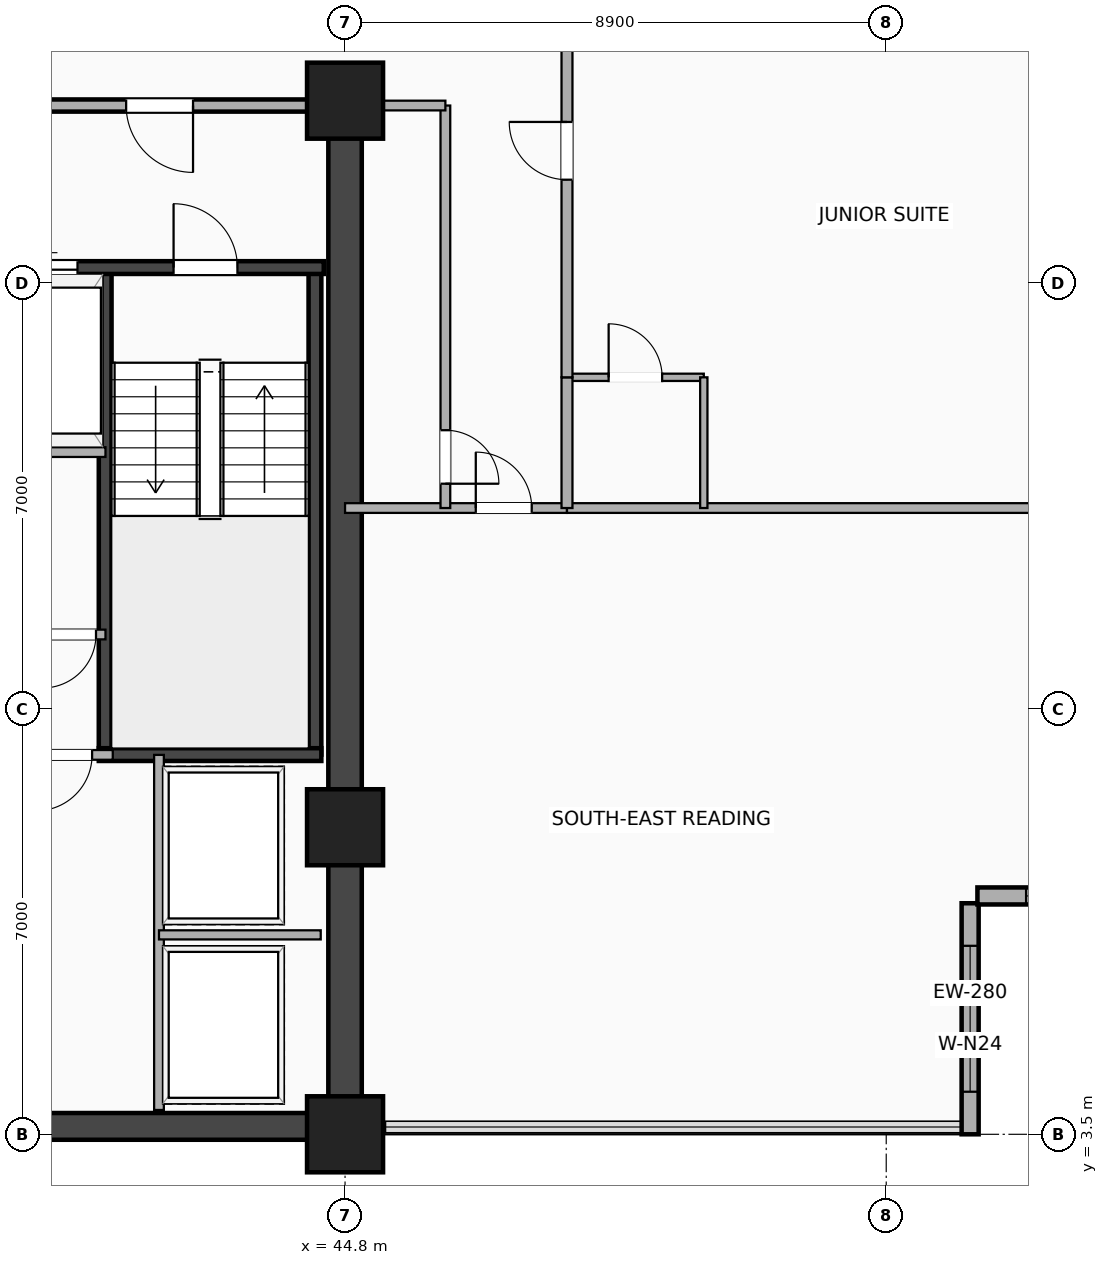
"""IFC4 building model, lengths in metres.
Left out: names, types, materials, properties, quantities, classifications, styles, units other than length and angle.
Written with IfcOpenShell. Run it as: python <this file> out.ifc"""

import sys

from ifc_helpers import new_model, si_unit, direction, frame, frame_2d, origin, origin_2d, place, context, subcontext, project, spatial, rectangle, extrude, element, fill, save


model = new_model("IFC4")
c1 = context("Model", 3, precision=1e-05, world=origin(), true_north=direction((0.0, 1.0)))
c2 = subcontext(c1, "Body", "Model", "MODEL_VIEW")
j1 = project(units=[si_unit("LENGTHUNIT", "METRE"), si_unit("PLANEANGLEUNIT", "RADIAN")], contexts=[c1])
p1 = place(None, origin())
s1 = spatial("IfcSite", under=j1, at=p1, CompositionType="ELEMENT")
p2 = place(p1, origin())
s2 = spatial("IfcBuilding", under=s1, at=p2, CompositionType="ELEMENT")
p3 = place(p2, frame((0.0, 0.0, 91.7)))
s3 = spatial("IfcBuildingStorey", under=s2, at=p3, CompositionType="ELEMENT", Elevation=91.7)
p4 = place(p3, frame((20.3, 3.63, 0.0), z_axis=(0.0, 0.0, 1.0), x_axis=(1.0, 0.0, 0.0)))
e1 = element("IfcWall", 1, at=p4, inside=s3, PredefinedType="SHEAR", context=c2, shape_type="SweptSolid", body=[
    extrude(rectangle(XDim=24.5, YDim=0.44, at=frame_2d((12.25, 0.0))), origin(), (0.0, 0.0, 1.0), 3.24),
])
p5 = place(p3, frame((44.8, 3.5, 0.0), z_axis=(0.0, 0.0, 1.0), x_axis=(0.0, 1.0, 0.0)))
e2 = element("IfcWall", 2, at=p5, inside=s3, PredefinedType="SHEAR", context=c2, shape_type="SweptSolid", body=[
    extrude(rectangle(XDim=16.9, YDim=0.55, at=frame_2d((8.45, 0.0))), origin(), (0.0, 0.0, 1.0), 3.24),
])
for number, where, z_axis, x_axis in (
    (3, (40.855, 9.745, 0.0), (0.0, 0.0, 1.0), (0.0, 1.0, 0.0)),
    (4, (44.305, 9.745, 0.0), (0.0, 0.0, 1.0), (0.0, 1.0, 0.0)),
):
    element("IfcWall", number, at=place(p3, frame(where, z_axis=z_axis, x_axis=x_axis)), inside=s3, PredefinedType="SHEAR", context=c2, shape_type="SweptSolid", body=[
        extrude(rectangle(XDim=8.01, YDim=0.21, at=frame_2d((4.005, 0.0))), origin(), (0.0, 0.0, 1.0), 3.24),
    ])
p6 = place(p3, frame((40.75, 9.745, 0.0), z_axis=(0.0, 0.0, 1.0), x_axis=(1.0, 0.0, 0.0)))
e5 = element("IfcWall", 5, at=p6, inside=s3, PredefinedType="SHEAR", context=c2, shape_type="SweptSolid", body=[
    extrude(rectangle(XDim=3.66, YDim=0.21, at=frame_2d((1.83, 0.0))), origin(), (0.0, 0.0, 1.0), 3.24),
])
p7 = place(p3, frame((37.25, 17.755, 0.0), z_axis=(0.0, 0.0, 1.0), x_axis=(1.0, 0.0, 0.0)))
e6 = element("IfcWall", 6, at=p7, inside=s3, PredefinedType="SHEAR", context=c2, shape_type="SweptSolid", body=[
    extrude(rectangle(XDim=7.2, YDim=0.21, at=frame_2d((3.6, 0.0))), origin(), (0.0, 0.0, 1.0), 3.24),
])
p8 = place(p7, frame((0.25, 0.0, 0.0)))
e7 = element("IfcOpeningElement", 7, at=p8, cuts=e6, PredefinedType="OPENING", context=c2, shape_type="SweptSolid", body=[
    extrude(rectangle(XDim=1.12, YDim=2.2, at=frame_2d((0.56, 1.1))), frame((0.0, 0.115, 0.0), z_axis=(0.0, -1.0, 0.0), x_axis=(1.0, 0.0, 0.0)), (0.0, 0.0, 1.0), 0.23),
])
p9 = place(p7, frame((2.05, 0.0, 0.0)))
e8 = element("IfcOpeningElement", 8, at=p9, cuts=e6, PredefinedType="OPENING", context=c2, shape_type="SweptSolid", body=[
    extrude(rectangle(XDim=1.1, YDim=2.18, at=frame_2d((0.55, 1.09))), frame((0.0, 0.115, 0.0), z_axis=(0.0, -1.0, 0.0), x_axis=(1.0, 0.0, 0.0)), (0.0, 0.0, 1.0), 0.23),
])
p10 = place(p7, frame((5.78, 0.0, 0.0), z_axis=(0.0, 0.0, 1.0), x_axis=(-1.0, 0.0, 0.0)))
e9 = element("IfcOpeningElement", 9, at=p10, cuts=e6, PredefinedType="OPENING", context=c2, shape_type="SweptSolid", body=[
    extrude(rectangle(XDim=1.05, YDim=2.15, at=frame_2d((0.525, 1.075))), frame((0.0, 0.115, 0.0), z_axis=(0.0, -1.0, 0.0), x_axis=(1.0, 0.0, 0.0)), (0.0, 0.0, 1.0), 0.23),
])
for number, where, z_axis, x_axis in (
    (10, (44.8, 3.5, -0.26), (0.0, 0.0, 1.0), (1.0, 0.0, 0.0)),
    (11, (44.8, 8.55, -0.26), (0.0, 0.0, 1.0), (1.0, 0.0, 0.0)),
    (12, (44.8, 20.5, -0.26), (0.0, 0.0, 1.0), (1.0, 0.0, 0.0)),
):
    element("IfcColumn", number, at=place(p3, frame(where, z_axis=z_axis, x_axis=x_axis)), inside=s3, PredefinedType="COLUMN", context=c2, shape_type="SweptSolid", body=[
        extrude(rectangle(XDim=1.25, YDim=1.25, at=origin_2d()), origin(), (0.0, 0.0, 1.0), 3.5),
    ])
p11 = place(p3, frame((55.08, 3.5, 0.0), z_axis=(0.0, 0.0, 1.0), x_axis=(0.0, 1.0, 0.0)))
e13 = element("IfcWall", 13, at=p11, inside=s3, PredefinedType="SOLIDWALL", context=c2, shape_type="SweptSolid", body=[
    extrude(rectangle(XDim=3.8, YDim=0.28, at=frame_2d((1.9, 0.0))), origin(), (0.0, 0.0, 1.0), 3.24),
])
p12 = place(p11, frame((0.7, 0.0, 0.85)))
e14 = element("IfcOpeningElement", 14, at=p12, cuts=e13, PredefinedType="OPENING", context=c2, shape_type="SweptSolid", body=[
    extrude(rectangle(XDim=2.4, YDim=1.65, at=frame_2d((1.2, 0.825))), frame((0.0, 0.15, 0.0), z_axis=(0.0, -1.0, 0.0), x_axis=(1.0, 0.0, 0.0)), (0.0, 0.0, 1.0), 0.3),
])
p13 = place(p3, frame((55.2, 7.42, 0.0), z_axis=(0.0, 0.0, 1.0), x_axis=(1.0, 0.0, 0.0)))
e15 = element("IfcWall", 15, at=p13, inside=s3, PredefinedType="SOLIDWALL", context=c2, shape_type="SweptSolid", body=[
    extrude(rectangle(XDim=3.8, YDim=0.28, at=frame_2d((1.9, 0.0))), origin(), (0.0, 0.0, 1.0), 3.24),
])
p14 = place(p13, frame((0.8, 0.0, 0.85)))
e16 = element("IfcOpeningElement", 16, at=p14, cuts=e15, PredefinedType="OPENING", context=c2, shape_type="SweptSolid", body=[
    extrude(rectangle(XDim=2.2, YDim=1.65, at=frame_2d((1.1, 0.825))), frame((0.0, 0.15, 0.0), z_axis=(0.0, -1.0, 0.0), x_axis=(1.0, 0.0, 0.0)), (0.0, 0.0, 1.0), 0.3),
])
p15 = place(p3, frame((37.25, 14.72, 0.0), z_axis=(0.0, 0.0, 1.0), x_axis=(1.0, 0.0, 0.0)))
e17 = element("IfcWall", 17, at=p15, inside=s3, PredefinedType="PARTITIONING", context=c2, shape_type="SweptSolid", body=[
    extrude(rectangle(XDim=3.61, YDim=0.16, at=frame_2d((1.805, 0.0))), origin(), (0.0, 0.0, 1.0), 3.24),
])
p16 = place(p3, frame((37.0, 20.42, 0.0), z_axis=(0.0, 0.0, 1.0), x_axis=(1.0, 0.0, 0.0)))
e18 = element("IfcWall", 18, at=p16, inside=s3, PredefinedType="PARTITIONING", context=c2, shape_type="SweptSolid", body=[
    extrude(rectangle(XDim=7.45, YDim=0.2, at=frame_2d((3.725, 0.0))), origin(), (0.0, 0.0, 1.0), 2.313),
])
p17 = place(p16, frame((4.2, 0.0, 0.0)))
e19 = element("IfcOpeningElement", 19, at=p17, cuts=e18, PredefinedType="OPENING", context=c2, shape_type="SweptSolid", body=[
    extrude(rectangle(XDim=1.1, YDim=2.15, at=frame_2d((0.55, 1.075))), frame((0.0, 0.11, 0.0), z_axis=(0.0, -1.0, 0.0), x_axis=(1.0, 0.0, 0.0)), (0.0, 0.0, 1.0), 0.22),
])
p18 = place(p3, frame((39.669, 11.72, 0.0), z_axis=(0.0, 0.0, 1.0), x_axis=(1.0, 0.0, 0.0)))
e20 = element("IfcWall", 20, at=p18, inside=s3, PredefinedType="PARTITIONING", context=c2, shape_type="SweptSolid", body=[
    extrude(rectangle(XDim=1.191, YDim=0.16, at=frame_2d((0.596, 0.0))), origin(), (0.0, 0.0, 1.0), 3.24),
])
p19 = place(p18, frame((0.156, 0.0, 0.0)))
e21 = element("IfcOpeningElement", 21, at=p19, cuts=e20, PredefinedType="OPENING", context=c2, shape_type="SweptSolid", body=[
    extrude(rectangle(XDim=0.88, YDim=2.08, at=frame_2d((0.44, 1.04))), frame((0.0, 0.09, 0.0), z_axis=(0.0, -1.0, 0.0), x_axis=(1.0, 0.0, 0.0)), (0.0, 0.0, 1.0), 0.18),
])
p20 = place(p3, frame((41.74, 3.9, 0.0), z_axis=(0.0, 0.0, 1.0), x_axis=(0.0, 1.0, 0.0)))
e22 = element("IfcWall", 22, at=p20, inside=s3, PredefinedType="PARTITIONING", context=c2, shape_type="SweptSolid", body=[
    extrude(rectangle(XDim=5.84, YDim=0.16, at=frame_2d((2.92, 0.0))), origin(), (0.0, 0.0, 1.0), 3.24),
])
p21 = place(p3, frame((41.74, 6.78, 0.0), z_axis=(0.0, 0.0, 1.0), x_axis=(1.0, 0.0, 0.0)))
e23 = element("IfcWall", 23, at=p21, inside=s3, PredefinedType="PARTITIONING", context=c2, shape_type="SweptSolid", body=[
    extrude(rectangle(XDim=2.66, YDim=0.15, at=frame_2d((1.33, 0.0))), origin(), (0.0, 0.0, 1.0), 2.313),
])
p22 = place(p3, frame((39.42, 9.74, 0.0), z_axis=(0.0, 0.0, 1.0), x_axis=(1.0, 0.0, 0.0)))
e24 = element("IfcWall", 24, at=p22, inside=s3, PredefinedType="PARTITIONING", context=c2, shape_type="SweptSolid", body=[
    extrude(rectangle(XDim=1.56, YDim=0.16, at=frame_2d((0.78, 0.0))), origin(), (0.0, 0.0, 1.0), 3.24),
])
p23 = place(p22, frame((0.3, 0.0, 0.0)))
e25 = element("IfcOpeningElement", 25, at=p23, cuts=e24, PredefinedType="OPENING", context=c2, shape_type="SweptSolid", body=[
    extrude(rectangle(XDim=0.92, YDim=2.08, at=frame_2d((0.46, 1.04))), frame((0.0, 0.09, 0.0), z_axis=(0.0, -1.0, 0.0), x_axis=(1.0, 0.0, 0.0)), (0.0, 0.0, 1.0), 0.18),
])
p24 = place(p3, frame((44.8, 13.8, 0.0), z_axis=(0.0, 0.0, 1.0), x_axis=(1.0, 0.0, 0.0)))
e26 = element("IfcWall", 26, at=p24, inside=s3, PredefinedType="PARTITIONING", context=c2, shape_type="SweptSolid", body=[
    extrude(rectangle(XDim=3.65, YDim=0.16, at=frame_2d((1.825, 0.0))), origin(), (0.0, 0.0, 1.0), 2.313),
])
p25 = place(p24, frame((3.07, 0.0, 0.0), z_axis=(0.0, 0.0, 1.0), x_axis=(-1.0, 0.0, 0.0)))
e27 = element("IfcOpeningElement", 27, at=p25, cuts=e26, PredefinedType="OPENING", context=c2, shape_type="SweptSolid", body=[
    extrude(rectangle(XDim=0.92, YDim=2.08, at=frame_2d((0.46, 1.04))), frame((0.0, 0.09, 0.0), z_axis=(0.0, -1.0, 0.0), x_axis=(1.0, 0.0, 0.0)), (0.0, 0.0, 1.0), 0.18),
])
p26 = place(p3, frame((46.45, 13.8, 0.0), z_axis=(0.0, 0.0, 1.0), x_axis=(0.0, 1.0, 0.0)))
e28 = element("IfcWall", 28, at=p26, inside=s3, PredefinedType="PARTITIONING", context=c2, shape_type="SweptSolid", body=[
    extrude(rectangle(XDim=6.62, YDim=0.16, at=frame_2d((3.31, 0.0))), origin(), (0.0, 0.0, 1.0), 2.313),
])
p27 = place(p26, frame((0.4, 0.0, 0.0)))
e29 = element("IfcOpeningElement", 29, at=p27, cuts=e28, PredefinedType="OPENING", context=c2, shape_type="SweptSolid", body=[
    extrude(rectangle(XDim=0.88, YDim=2.08, at=frame_2d((0.44, 1.04))), frame((0.0, 0.09, 0.0), z_axis=(0.0, -1.0, 0.0), x_axis=(1.0, 0.0, 0.0)), (0.0, 0.0, 1.0), 0.18),
])
p28 = place(p3, frame((44.8, 20.42, 0.0), z_axis=(0.0, 0.0, 1.0), x_axis=(1.0, 0.0, 0.0)))
e30 = element("IfcWall", 30, at=p28, inside=s3, PredefinedType="PARTITIONING", context=c2, shape_type="SweptSolid", body=[
    extrude(rectangle(XDim=1.65, YDim=0.16, at=frame_2d((0.825, 0.0))), origin(), (0.0, 0.0, 1.0), 2.313),
])
p29 = place(p3, frame((48.45, 13.8, 0.0), z_axis=(0.0, 0.0, 1.0), x_axis=(1.0, 0.0, 0.0)))
e31 = element("IfcWall", 31, at=p29, inside=s3, PredefinedType="PARTITIONING", context=c2, shape_type="SweptSolid", body=[
    extrude(rectangle(XDim=10.43, YDim=0.16, at=frame_2d((5.215, 0.0))), origin(), (0.0, 0.0, 1.0), 2.603),
])
p30 = place(p3, frame((48.45, 15.95, 0.0), z_axis=(0.0, 0.0, 1.0), x_axis=(1.0, 0.0, 0.0)))
e32 = element("IfcWall", 32, at=p30, inside=s3, PredefinedType="PARTITIONING", context=c2, shape_type="SweptSolid", body=[
    extrude(rectangle(XDim=2.25, YDim=0.12, at=frame_2d((1.125, 0.0))), origin(), (0.0, 0.0, 1.0), 3.24),
])
p31 = place(p30, frame((1.565, 0.0, 0.0), z_axis=(0.0, 0.0, 1.0), x_axis=(-1.0, 0.0, 0.0)))
e33 = element("IfcOpeningElement", 33, at=p31, cuts=e32, PredefinedType="OPENING", context=c2, shape_type="SweptSolid", body=[
    extrude(rectangle(XDim=0.88, YDim=2.08, at=frame_2d((0.44, 1.04))), frame((0.0, 0.07, 0.0), z_axis=(0.0, -1.0, 0.0), x_axis=(1.0, 0.0, 0.0)), (0.0, 0.0, 1.0), 0.14),
])
p32 = place(p3, frame((50.7, 13.8, 0.0), z_axis=(0.0, 0.0, 1.0), x_axis=(0.0, 1.0, 0.0)))
e34 = element("IfcWall", 34, at=p32, inside=s3, PredefinedType="PARTITIONING", context=c2, shape_type="SweptSolid", body=[
    extrude(rectangle(XDim=2.15, YDim=0.12, at=frame_2d((1.075, 0.0))), origin(), (0.0, 0.0, 1.0), 2.922),
])
p33 = place(p3, frame((48.45, 13.8, 0.0), z_axis=(0.0, 0.0, 1.0), x_axis=(0.0, 1.0, 0.0)))
e35 = element("IfcWall", 35, at=p33, inside=s3, PredefinedType="PARTITIONING", context=c2, shape_type="SweptSolid", body=[
    extrude(rectangle(XDim=2.15, YDim=0.18, at=frame_2d((1.075, 0.0))), origin(), (0.0, 0.0, 1.0), 2.922),
])
p34 = place(p3, frame((48.45, 15.95, 0.0), z_axis=(0.0, 0.0, 1.0), x_axis=(0.0, 1.0, 0.0)))
e36 = element("IfcWall", 36, at=p34, inside=s3, PredefinedType="PARTITIONING", context=c2, shape_type="SweptSolid", body=[
    extrude(rectangle(XDim=7.45, YDim=0.18, at=frame_2d((3.725, 0.0))), origin(), (0.0, 0.0, 1.0), 2.313),
])
p35 = place(p34, frame((4.2, 0.0, 0.0), z_axis=(0.0, 0.0, 1.0), x_axis=(-1.0, 0.0, 0.0)))
e37 = element("IfcOpeningElement", 37, at=p35, cuts=e36, PredefinedType="OPENING", context=c2, shape_type="SweptSolid", body=[
    extrude(rectangle(XDim=0.95, YDim=2.15, at=frame_2d((0.475, 1.075))), frame((0.0, 0.1, 0.0), z_axis=(0.0, -1.0, 0.0), x_axis=(1.0, 0.0, 0.0)), (0.0, 0.0, 1.0), 0.2),
])
p36 = place(p12, origin())
e38 = element("IfcWindow", 38, at=p36, inside=s3, PartitioningType="SINGLE_PANEL", PredefinedType="WINDOW", context=c2, shape_type="SweptSolid", body=[
    extrude(rectangle(XDim=2.4, YDim=1.65, at=frame_2d((1.2, 0.825))), frame((0.0, 0.03, 0.0), z_axis=(0.0, -1.0, 0.0), x_axis=(1.0, 0.0, 0.0)), (0.0, 0.0, 1.0), 0.06),
])
fill(e14, e38)
p37 = place(p14, origin())
e39 = element("IfcWindow", 39, at=p37, inside=s3, PartitioningType="SINGLE_PANEL", PredefinedType="WINDOW", context=c2, shape_type="SweptSolid", body=[
    extrude(rectangle(XDim=2.2, YDim=1.65, at=frame_2d((1.1, 0.825))), frame((0.0, 0.03, 0.0), z_axis=(0.0, -1.0, 0.0), x_axis=(1.0, 0.0, 0.0)), (0.0, 0.0, 1.0), 0.06),
])
fill(e16, e39)
p38 = place(p9, origin())
e40 = element("IfcDoor", 40, at=p38, inside=s3, OperationType="DOUBLE_DOOR_SLIDING", PredefinedType="DOOR", context=c2, shape_type="SweptSolid", body=[
    extrude(rectangle(XDim=1.1, YDim=2.18, at=frame_2d((0.55, 1.09))), frame((0.0, 0.025, 0.0), z_axis=(0.0, -1.0, 0.0), x_axis=(1.0, 0.0, 0.0)), (0.0, 0.0, 1.0), 0.05),
])
fill(e8, e40)
p39 = place(p10, origin())
e41 = element("IfcDoor", 41, at=p39, inside=s3, OperationType="SINGLE_SWING_LEFT", PredefinedType="DOOR", context=c2, shape_type="SweptSolid", body=[
    extrude(rectangle(XDim=1.05, YDim=2.15, at=frame_2d((0.525, 1.075))), frame((0.0, 0.025, 0.0), z_axis=(0.0, -1.0, 0.0), x_axis=(1.0, 0.0, 0.0)), (0.0, 0.0, 1.0), 0.05),
])
fill(e9, e41)
p40 = place(p17, origin())
e42 = element("IfcDoor", 42, at=p40, inside=s3, OperationType="SINGLE_SWING_RIGHT", PredefinedType="DOOR", context=c2, shape_type="SweptSolid", body=[
    extrude(rectangle(XDim=1.1, YDim=2.15, at=frame_2d((0.55, 1.075))), frame((0.0, 0.025, 0.0), z_axis=(0.0, -1.0, 0.0), x_axis=(1.0, 0.0, 0.0)), (0.0, 0.0, 1.0), 0.05),
])
fill(e19, e42)
p41 = place(p19, origin())
e43 = element("IfcDoor", 43, at=p41, inside=s3, OperationType="SINGLE_SWING_LEFT", PredefinedType="DOOR", context=c2, shape_type="SweptSolid", body=[
    extrude(rectangle(XDim=0.88, YDim=2.08, at=frame_2d((0.44, 1.04))), frame((0.0, 0.025, 0.0), z_axis=(0.0, -1.0, 0.0), x_axis=(1.0, 0.0, 0.0)), (0.0, 0.0, 1.0), 0.05),
])
fill(e21, e43)
p42 = place(p23, origin())
e44 = element("IfcDoor", 44, at=p42, inside=s3, OperationType="SINGLE_SWING_LEFT", PredefinedType="DOOR", context=c2, shape_type="SweptSolid", body=[
    extrude(rectangle(XDim=0.92, YDim=2.08, at=frame_2d((0.46, 1.04))), frame((0.0, 0.025, 0.0), z_axis=(0.0, -1.0, 0.0), x_axis=(1.0, 0.0, 0.0)), (0.0, 0.0, 1.0), 0.05),
])
fill(e25, e44)
p43 = place(p25, origin())
e45 = element("IfcDoor", 45, at=p43, inside=s3, OperationType="SINGLE_SWING_LEFT", PredefinedType="DOOR", context=c2, shape_type="SweptSolid", body=[
    extrude(rectangle(XDim=0.92, YDim=2.08, at=frame_2d((0.46, 1.04))), frame((0.0, 0.025, 0.0), z_axis=(0.0, -1.0, 0.0), x_axis=(1.0, 0.0, 0.0)), (0.0, 0.0, 1.0), 0.05),
])
fill(e27, e45)
p44 = place(p27, origin())
e46 = element("IfcDoor", 46, at=p44, inside=s3, OperationType="SINGLE_SWING_LEFT", PredefinedType="DOOR", context=c2, shape_type="SweptSolid", body=[
    extrude(rectangle(XDim=0.88, YDim=2.08, at=frame_2d((0.44, 1.04))), frame((0.0, 0.025, 0.0), z_axis=(0.0, -1.0, 0.0), x_axis=(1.0, 0.0, 0.0)), (0.0, 0.0, 1.0), 0.05),
])
fill(e29, e46)
p45 = place(p31, origin())
e47 = element("IfcDoor", 47, at=p45, inside=s3, OperationType="SINGLE_SWING_LEFT", PredefinedType="DOOR", context=c2, shape_type="SweptSolid", body=[
    extrude(rectangle(XDim=0.88, YDim=2.08, at=frame_2d((0.44, 1.04))), frame((0.0, 0.025, 0.0), z_axis=(0.0, -1.0, 0.0), x_axis=(1.0, 0.0, 0.0)), (0.0, 0.0, 1.0), 0.05),
])
fill(e33, e47)
p46 = place(p35, origin())
e48 = element("IfcDoor", 48, at=p46, inside=s3, OperationType="SINGLE_SWING_RIGHT", PredefinedType="DOOR", context=c2, shape_type="SweptSolid", body=[
    extrude(rectangle(XDim=0.95, YDim=2.15, at=frame_2d((0.475, 1.075))), frame((0.0, 0.025, 0.0), z_axis=(0.0, -1.0, 0.0), x_axis=(1.0, 0.0, 0.0)), (0.0, 0.0, 1.0), 0.05),
])
fill(e37, e48)
save(model, sys.argv[1])
